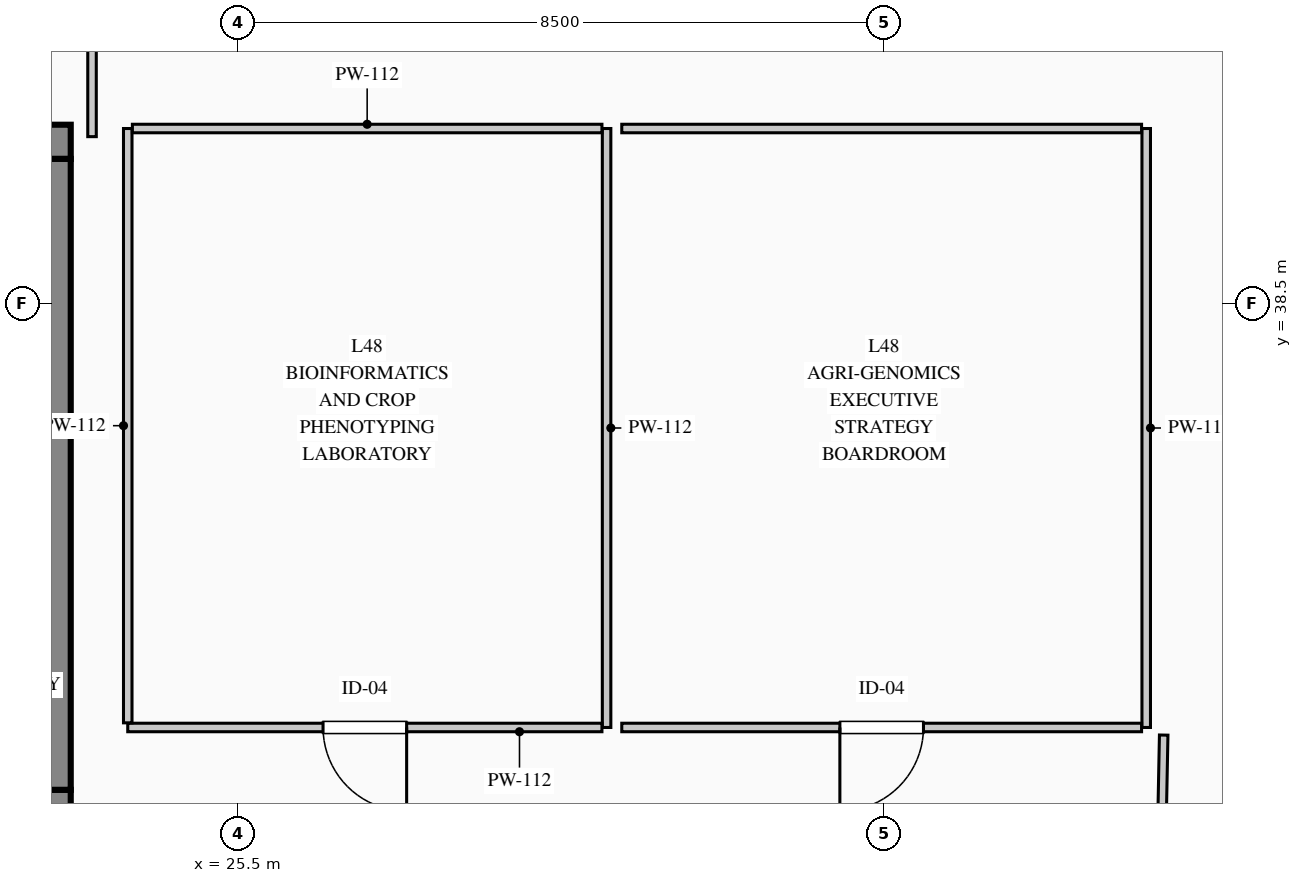
"""IFC4 building model, lengths in metres.
Left out: names, types, materials, properties, quantities, classifications, styles, units other than length and angle.
Written with IfcOpenShell. Run it as: python <this file> out.ifc"""

import sys

from ifc_helpers import new_model, si_unit, direction, frame, frame_2d, origin, place, context, subcontext, project, spatial, rectangle, extrude, element, fill, save


model = new_model("IFC4")
c1 = context("Model", 3, precision=1e-05, world=origin(), true_north=direction((0.0, 1.0)))
c2 = subcontext(c1, "Body", "Model", "MODEL_VIEW")
j1 = project(units=[si_unit("LENGTHUNIT", "METRE"), si_unit("PLANEANGLEUNIT", "RADIAN")], contexts=[c1])
p1 = place(None, origin())
s1 = spatial("IfcSite", under=j1, at=p1, CompositionType="ELEMENT")
p2 = place(p1, origin())
s2 = spatial("IfcBuilding", under=s1, at=p2, CompositionType="ELEMENT")
p3 = place(p2, frame((0.0, 0.0, 203.5)))
s3 = spatial("IfcBuildingStorey", under=s2, at=p3, CompositionType="ELEMENT", Elevation=203.5)
p4 = place(p3, frame((5.55, 40.625, 0.0), z_axis=(0.0, 0.0, 1.0), x_axis=(1.0, 0.0, 0.0)))
e1 = element("IfcWall", 1, at=p4, inside=s3, PredefinedType="SHEAR", context=c2, shape_type="SweptSolid", body=[
    extrude(rectangle(XDim=17.75, YDim=0.45, at=frame_2d((8.875, 0.0))), origin(), (0.0, 0.0, 1.0), 3.95),
])
p5 = place(p4, frame((15.895, 0.0, 0.0)))
e2 = element("IfcOpeningElement", 2, at=p5, cuts=e1, PredefinedType="OPENING", context=c2, shape_type="SweptSolid", body=[
    extrude(rectangle(XDim=1.18, YDim=2.25, at=frame_2d((0.59, 1.125))), frame((0.0, 0.235, 0.0), z_axis=(0.0, -1.0, 0.0), x_axis=(1.0, 0.0, 0.0)), (0.0, 0.0, 1.0), 0.47),
])
p6 = place(p3, frame((5.55, 31.875, 0.0), z_axis=(0.0, 0.0, 1.0), x_axis=(1.0, 0.0, 0.0)))
e3 = element("IfcWall", 3, at=p6, inside=s3, PredefinedType="SHEAR", context=c2, shape_type="SweptSolid", body=[
    extrude(rectangle(XDim=17.75, YDim=0.45, at=frame_2d((8.875, 0.0))), origin(), (0.0, 0.0, 1.0), 3.95),
])
p7 = place(p6, frame((3.1, 0.0, 0.0)))
e4 = element("IfcOpeningElement", 4, at=p7, cuts=e3, PredefinedType="OPENING", context=c2, shape_type="SweptSolid", body=[
    extrude(rectangle(XDim=1.2, YDim=2.2, at=frame_2d((0.6, 1.1))), frame((0.0, 0.235, 0.0), z_axis=(0.0, -1.0, 0.0), x_axis=(1.0, 0.0, 0.0)), (0.0, 0.0, 1.0), 0.47),
])
p8 = place(p6, frame((6.95, 0.0, 0.0)))
e5 = element("IfcOpeningElement", 5, at=p8, cuts=e3, PredefinedType="OPENING", context=c2, shape_type="SweptSolid", body=[
    extrude(rectangle(XDim=1.2, YDim=2.2, at=frame_2d((0.6, 1.1))), frame((0.0, 0.235, 0.0), z_axis=(0.0, -1.0, 0.0), x_axis=(1.0, 0.0, 0.0)), (0.0, 0.0, 1.0), 0.47),
])
p9 = place(p6, frame((8.8, 0.0, 0.0)))
e6 = element("IfcOpeningElement", 6, at=p9, cuts=e3, PredefinedType="OPENING", context=c2, shape_type="SweptSolid", body=[
    extrude(rectangle(XDim=1.15, YDim=2.2, at=frame_2d((0.575, 1.1))), frame((0.0, 0.235, 0.0), z_axis=(0.0, -1.0, 0.0), x_axis=(1.0, 0.0, 0.0)), (0.0, 0.0, 1.0), 0.47),
])
p10 = place(p6, frame((15.9, 0.0, 0.0)))
e7 = element("IfcOpeningElement", 7, at=p10, cuts=e3, PredefinedType="OPENING", context=c2, shape_type="SweptSolid", body=[
    extrude(rectangle(XDim=1.2, YDim=2.2, at=frame_2d((0.6, 1.1))), frame((0.0, 0.235, 0.0), z_axis=(0.0, -1.0, 0.0), x_axis=(1.0, 0.0, 0.0)), (0.0, 0.0, 1.0), 0.47),
])
p11 = place(p3, frame((23.075, 32.1, 0.0), z_axis=(0.0, 0.0, 1.0), x_axis=(0.0, 1.0, 0.0)))
e8 = element("IfcWall", 8, at=p11, inside=s3, PredefinedType="SHEAR", context=c2, shape_type="SweptSolid", body=[
    extrude(rectangle(XDim=8.3, YDim=0.45, at=frame_2d((4.15, 0.0))), origin(), (0.0, 0.0, 1.0), 3.95),
])
p12 = place(p3, frame((30.35, 40.8, 0.0), z_axis=(0.0, 0.0, 1.0), x_axis=(0.0, -1.0, 0.0)))
e9 = element("IfcWall", 9, at=p12, inside=s3, PredefinedType="PARTITIONING", context=c2, shape_type="SweptSolid", body=[
    extrude(rectangle(XDim=7.88, YDim=0.112, at=frame_2d((3.94, 0.0))), origin(), (0.0, 0.0, 1.0), 3.7),
])
p13 = place(p3, frame((30.289, 32.92, 0.0), z_axis=(0.0, 0.0, 1.0), x_axis=(-1.0, 0.0, 0.0)))
e10 = element("IfcWall", 10, at=p13, inside=s3, PredefinedType="PARTITIONING", context=c2, shape_type="SweptSolid", body=[
    extrude(rectangle(XDim=6.239, YDim=0.112, at=frame_2d((3.12, 0.0))), origin(), (0.0, 0.0, 1.0), 3.7),
])
p14 = place(p13, frame((2.57, 0.0, 0.0)))
e11 = element("IfcOpeningElement", 11, at=p14, cuts=e10, PredefinedType="OPENING", context=c2, shape_type="SweptSolid", body=[
    extrude(rectangle(XDim=1.1, YDim=2.2, at=frame_2d((0.55, 1.1))), frame((0.0, 0.066, 0.0), z_axis=(0.0, -1.0, 0.0), x_axis=(1.0, 0.0, 0.0)), (0.0, 0.0, 1.0), 0.132),
])
p15 = place(p3, frame((24.05, 32.981, 0.0), z_axis=(0.0, 0.0, 1.0), x_axis=(0.0, 1.0, 0.0)))
e12 = element("IfcWall", 12, at=p15, inside=s3, PredefinedType="PARTITIONING", context=c2, shape_type="SweptSolid", body=[
    extrude(rectangle(XDim=7.819, YDim=0.112, at=frame_2d((3.91, 0.0))), origin(), (0.0, 0.0, 1.0), 3.7),
])
p16 = place(p3, frame((24.111, 40.8, 0.0), z_axis=(0.0, 0.0, 1.0), x_axis=(1.0, 0.0, 0.0)))
e13 = element("IfcWall", 13, at=p16, inside=s3, PredefinedType="PARTITIONING", context=c2, shape_type="SweptSolid", body=[
    extrude(rectangle(XDim=6.178, YDim=0.112, at=frame_2d((3.089, 0.0))), origin(), (0.0, 0.0, 1.0), 3.7),
])
p17 = place(p3, frame((37.45, 40.8, 0.0), z_axis=(0.0, 0.0, 1.0), x_axis=(0.0, -1.0, 0.0)))
e14 = element("IfcWall", 14, at=p17, inside=s3, PredefinedType="PARTITIONING", context=c2, shape_type="SweptSolid", body=[
    extrude(rectangle(XDim=7.88, YDim=0.112, at=frame_2d((3.94, 0.0))), origin(), (0.0, 0.0, 1.0), 3.7),
])
p18 = place(p3, frame((37.389, 32.92, 0.0), z_axis=(0.0, 0.0, 1.0), x_axis=(-1.0, 0.0, 0.0)))
e15 = element("IfcWall", 15, at=p18, inside=s3, PredefinedType="PARTITIONING", context=c2, shape_type="SweptSolid", body=[
    extrude(rectangle(XDim=6.839, YDim=0.112, at=frame_2d((3.419, 0.0))), origin(), (0.0, 0.0, 1.0), 3.7),
])
p19 = place(p18, frame((2.869, 0.0, 0.0)))
e16 = element("IfcOpeningElement", 16, at=p19, cuts=e15, PredefinedType="OPENING", context=c2, shape_type="SweptSolid", body=[
    extrude(rectangle(XDim=1.1, YDim=2.2, at=frame_2d((0.55, 1.1))), frame((0.0, 0.066, 0.0), z_axis=(0.0, -1.0, 0.0), x_axis=(1.0, 0.0, 0.0)), (0.0, 0.0, 1.0), 0.132),
])
p20 = place(p3, frame((30.55, 40.8, 0.0), z_axis=(0.0, 0.0, 1.0), x_axis=(1.0, 0.0, 0.0)))
e17 = element("IfcWall", 17, at=p20, inside=s3, PredefinedType="PARTITIONING", context=c2, shape_type="SweptSolid", body=[
    extrude(rectangle(XDim=6.839, YDim=0.112, at=frame_2d((3.419, 0.0))), origin(), (0.0, 0.0, 1.0), 3.7),
])
p21 = place(p3, frame((23.58, 40.693, 0.0), z_axis=(0.0, 0.0, 1.0), x_axis=(0.0, 1.0, 0.0)))
e18 = element("IfcWall", 18, at=p21, inside=s3, PredefinedType="PARTITIONING", context=c2, shape_type="SweptSolid", body=[
    extrude(rectangle(XDim=2.542, YDim=0.112, at=frame_2d((1.271, 0.0))), origin(), (0.0, 0.0, 1.0), 3.7),
])
p22 = place(p3, frame((37.599, 28.691, 0.0), z_axis=(0.0, 0.0, 1.0), x_axis=(0.019566997539, 0.999808547977, 0.0)))
e19 = element("IfcWall", 19, at=p22, inside=s3, PredefinedType="PARTITIONING", context=c2, shape_type="SweptSolid", body=[
    extrude(rectangle(XDim=4.13, YDim=0.112, at=frame_2d((2.065, 0.0))), origin(), (0.0, 0.0, 1.0), 3.7),
])
p23 = place(p22, frame((1.515, 0.0, 0.0)))
e20 = element("IfcOpeningElement", 20, at=p23, cuts=e19, PredefinedType="OPENING", context=c2, shape_type="SweptSolid", body=[
    extrude(rectangle(XDim=1.1, YDim=2.2, at=frame_2d((0.55, 1.1))), frame((0.0, 0.066, 0.0), z_axis=(0.0, -1.0, 0.0), x_axis=(1.0, 0.0, 0.0)), (0.0, 0.0, 1.0), 0.132),
])
p24 = place(p14, origin())
e21 = element("IfcDoor", 21, at=p24, inside=s3, OperationType="SINGLE_SWING_LEFT", PredefinedType="DOOR", context=c2, shape_type="SweptSolid", body=[
    extrude(rectangle(XDim=1.1, YDim=2.2, at=frame_2d((0.55, 1.1))), frame((0.0, 0.025, 0.0), z_axis=(0.0, -1.0, 0.0), x_axis=(1.0, 0.0, 0.0)), (0.0, 0.0, 1.0), 0.05),
])
fill(e11, e21)
p25 = place(p19, origin())
e22 = element("IfcDoor", 22, at=p25, inside=s3, OperationType="SINGLE_SWING_RIGHT", PredefinedType="DOOR", context=c2, shape_type="SweptSolid", body=[
    extrude(rectangle(XDim=1.1, YDim=2.2, at=frame_2d((0.55, 1.1))), frame((0.0, 0.025, 0.0), z_axis=(0.0, -1.0, 0.0), x_axis=(1.0, 0.0, 0.0)), (0.0, 0.0, 1.0), 0.05),
])
fill(e16, e22)
save(model, sys.argv[1])
